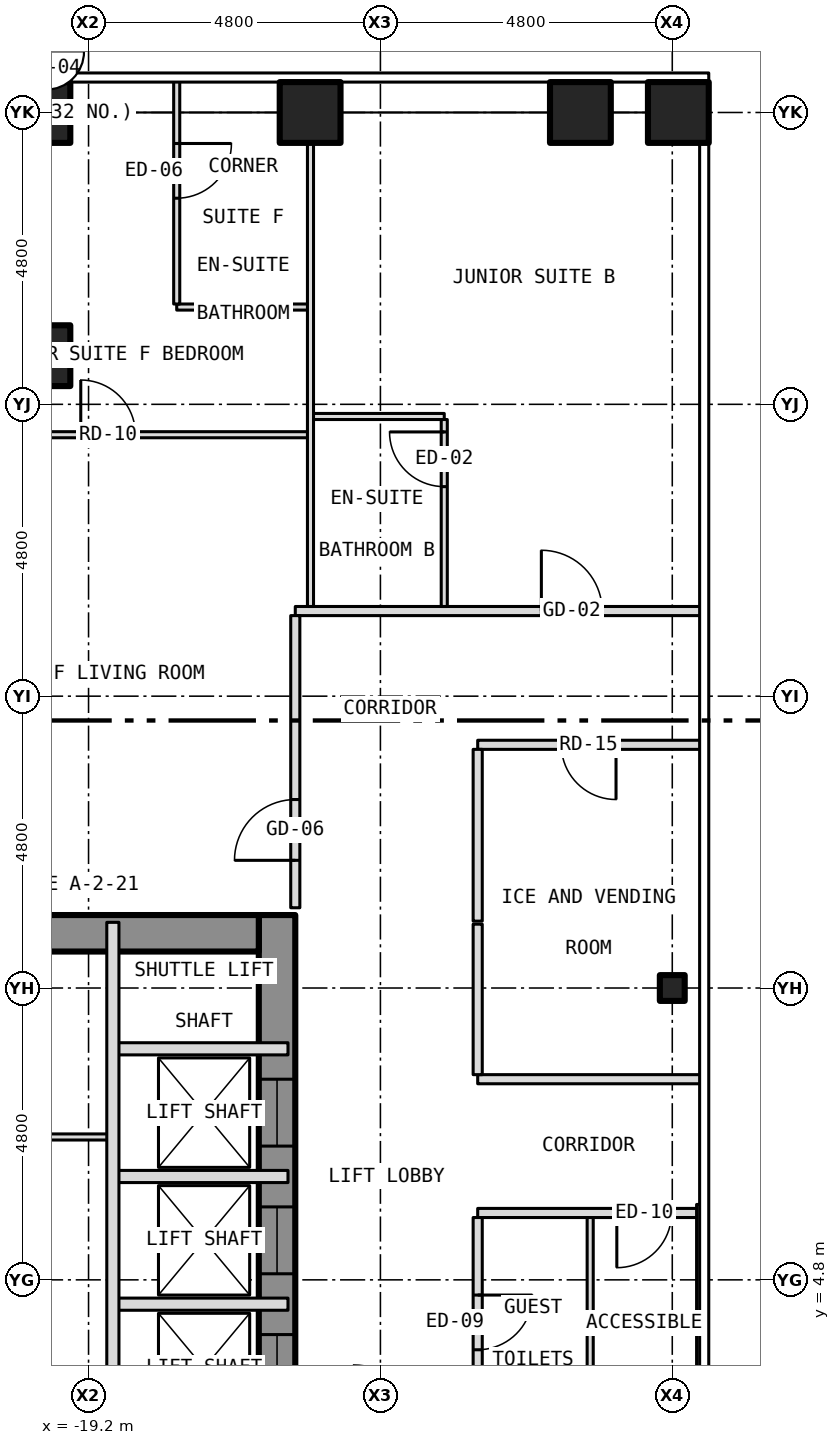
"""IFC4 building model, lengths in metres.
Left out: names, types, materials, properties, quantities, classifications, styles, units other than length and angle.
Written with IfcOpenShell. Run it as: python <this file> out.ifc"""

import sys

from ifc_helpers import new_model, si_unit, direction, frame, frame_2d, origin, origin_2d, place, context, subcontext, project, spatial, rectangle, hollow_rectangle, i_section, extrude, element, fill, save


model = new_model("IFC4")
c1 = context("Model", 3, precision=1e-05, world=origin(), true_north=direction((0.0, 1.0)))
c2 = subcontext(c1, "Body", "Model", "MODEL_VIEW")
j1 = project(units=[si_unit("LENGTHUNIT", "METRE"), si_unit("PLANEANGLEUNIT", "RADIAN")], contexts=[c1])
p1 = place(None, origin())
s1 = spatial("IfcSite", under=j1, at=p1, CompositionType="ELEMENT")
p2 = place(p1, origin())
s2 = spatial("IfcBuilding", under=s1, at=p2, CompositionType="ELEMENT")
p3 = place(p2, frame((0.0, 0.0, 77.5)))
s3 = spatial("IfcBuildingStorey", under=s2, at=p3, CompositionType="ELEMENT", Elevation=77.5)
for number, where, z_axis, x_axis in (
    (1, (-20.0, 24.0, -0.15), (0.0, 0.0, 1.0), (1.0, 0.0, 0.0)),
    (2, (-15.556, 24.0, -0.15), (0.0, 0.0, 1.0), (1.0, 0.0, 0.0)),
    (3, (-11.111, 24.0, -0.15), (0.0, 0.0, 1.0), (1.0, 0.0, 0.0)),
    (4, (-20.0, 20.0, -0.15), (0.0, 0.0, 1.0), (1.0, 0.0, 0.0)),
    (5, (-9.5, 24.0, -0.15), (0.0, 0.0, 1.0), (1.0, 0.0, 0.0)),
):
    element("IfcColumn", number, at=place(p3, frame(where, z_axis=z_axis, x_axis=x_axis)), inside=s3, PredefinedType="COLUMN", context=c2, shape_type="SweptSolid", body=[
        extrude(hollow_rectangle(XDim=1.0, YDim=1.0, WallThickness=0.06, at=origin_2d()), origin(), (0.0, 0.0, 1.0), 3.5),
    ])
p4 = place(p3, frame((-9.6, 9.6, -0.15), z_axis=(0.0, 0.0, 1.0), x_axis=(1.0, 0.0, 0.0)))
e6 = element("IfcColumn", 6, at=p4, inside=s3, PredefinedType="COLUMN", context=c2, shape_type="SweptSolid", body=[
    extrude(i_section(OverallWidth=0.409, OverallDepth=0.424, WebThickness=0.033, FlangeThickness=0.052, at=origin_2d()), origin(), (0.0, 0.0, 1.0), 3.5),
])
p5 = place(p3, frame((-16.1, -10.8, 0.0), z_axis=(0.0, 0.0, 1.0), x_axis=(0.0, 1.0, 0.0)))
e7 = element("IfcWall", 7, at=p5, inside=s3, PredefinedType="SHEAR", context=c2, shape_type="SweptSolid", body=[
    extrude(rectangle(XDim=21.6, YDim=0.6, at=frame_2d((10.8, 0.0))), origin(), (0.0, 0.0, 1.0), 3.25),
])
p6 = place(p5, frame((9.4, 0.0, 0.0)))
e8 = element("IfcOpeningElement", 8, at=p6, cuts=e7, PredefinedType="OPENING", context=c2, shape_type="SweptSolid", body=[
    extrude(rectangle(XDim=1.1, YDim=2.1, at=frame_2d((0.55, 1.05))), frame((0.0, 0.312, 0.0), z_axis=(0.0, -1.0, 0.0), x_axis=(1.0, 0.0, 0.0)), (0.0, 0.0, 1.0), 0.624),
])
p7 = place(p5, frame((11.5, 0.0, 0.0)))
e9 = element("IfcOpeningElement", 9, at=p7, cuts=e7, PredefinedType="OPENING", context=c2, shape_type="SweptSolid", body=[
    extrude(rectangle(XDim=1.1, YDim=2.1, at=frame_2d((0.55, 1.05))), frame((0.0, 0.312, 0.0), z_axis=(0.0, -1.0, 0.0), x_axis=(1.0, 0.0, 0.0)), (0.0, 0.0, 1.0), 0.624),
])
p8 = place(p5, frame((13.6, 0.0, 0.0)))
e10 = element("IfcOpeningElement", 10, at=p8, cuts=e7, PredefinedType="OPENING", context=c2, shape_type="SweptSolid", body=[
    extrude(rectangle(XDim=1.1, YDim=2.1, at=frame_2d((0.55, 1.05))), frame((0.0, 0.312, 0.0), z_axis=(0.0, -1.0, 0.0), x_axis=(1.0, 0.0, 0.0)), (0.0, 0.0, 1.0), 0.624),
])
p9 = place(p5, frame((15.7, 0.0, 0.0)))
e11 = element("IfcOpeningElement", 11, at=p9, cuts=e7, PredefinedType="OPENING", context=c2, shape_type="SweptSolid", body=[
    extrude(rectangle(XDim=1.1, YDim=2.1, at=frame_2d((0.55, 1.05))), frame((0.0, 0.312, 0.0), z_axis=(0.0, -1.0, 0.0), x_axis=(1.0, 0.0, 0.0)), (0.0, 0.0, 1.0), 0.624),
])
p10 = place(p5, frame((17.8, 0.0, 0.0)))
e12 = element("IfcOpeningElement", 12, at=p10, cuts=e7, PredefinedType="OPENING", context=c2, shape_type="SweptSolid", body=[
    extrude(rectangle(XDim=1.1, YDim=2.1, at=frame_2d((0.55, 1.05))), frame((0.0, 0.312, 0.0), z_axis=(0.0, -1.0, 0.0), x_axis=(1.0, 0.0, 0.0)), (0.0, 0.0, 1.0), 0.624),
])
p11 = place(p5, frame((0.758, 0.0, 0.0)))
e13 = element("IfcOpeningElement", 13, at=p11, cuts=e7, PredefinedType="OPENING", context=c2, shape_type="SweptSolid", body=[
    extrude(rectangle(XDim=1.1, YDim=2.1, at=frame_2d((0.55, 1.05))), frame((0.0, 0.312, 0.0), z_axis=(0.0, -1.0, 0.0), x_axis=(1.0, 0.0, 0.0)), (0.0, 0.0, 1.0), 0.624),
])
p12 = place(p5, frame((7.5, 0.0, 0.0)))
e14 = element("IfcOpeningElement", 14, at=p12, cuts=e7, PredefinedType="OPENING", context=c2, shape_type="SweptSolid", body=[
    extrude(rectangle(XDim=1.1, YDim=2.1, at=frame_2d((0.55, 1.05))), frame((0.0, 0.312, 0.0), z_axis=(0.0, -1.0, 0.0), x_axis=(1.0, 0.0, 0.0)), (0.0, 0.0, 1.0), 0.624),
])
p13 = place(p3, frame((-23.4, 10.5, 0.0), z_axis=(0.0, 0.0, 1.0), x_axis=(1.0, 0.0, 0.0)))
e15 = element("IfcWall", 15, at=p13, inside=s3, PredefinedType="SHEAR", context=c2, shape_type="SweptSolid", body=[
    extrude(rectangle(XDim=7.0, YDim=0.6, at=frame_2d((3.5, 0.0))), origin(), (0.0, 0.0, 1.0), 3.25),
])
p14 = place(p3, frame((-18.8, 4.4, 0.0), z_axis=(0.0, 0.0, 1.0), x_axis=(1.0, 0.0, 0.0)))
e16 = element("IfcWall", 16, at=p14, inside=s3, PredefinedType="PARTITIONING", context=c2, shape_type="SweptSolid", body=[
    extrude(rectangle(XDim=2.88, YDim=0.2, at=frame_2d((1.44, 0.0))), origin(), (0.0, 0.0, 1.0), 3.25),
])
p15 = place(p3, frame((-12.8, 5.9, 0.0), z_axis=(0.0, 0.0, 1.0), x_axis=(1.0, 0.0, 0.0)))
e17 = element("IfcWall", 17, at=p15, inside=s3, PredefinedType="PARTITIONING", context=c2, shape_type="SweptSolid", body=[
    extrude(rectangle(XDim=3.65, YDim=0.15, at=frame_2d((1.825, 0.0))), origin(), (0.0, 0.0, 1.0), 3.35),
])
p16 = place(p15, frame((2.288, 0.0, 0.0)))
e18 = element("IfcOpeningElement", 18, at=p16, cuts=e17, PredefinedType="OPENING", context=c2, shape_type="SweptSolid", body=[
    extrude(rectangle(XDim=0.9, YDim=2.1, at=frame_2d((0.45, 1.05))), frame((0.0, 0.087, 0.0), z_axis=(0.0, -1.0, 0.0), x_axis=(1.0, 0.0, 0.0)), (0.0, 0.0, 1.0), 0.174),
])
p17 = place(p3, frame((-18.8, 6.5, 0.0), z_axis=(0.0, 0.0, 1.0), x_axis=(1.0, 0.0, 0.0)))
e19 = element("IfcWall", 19, at=p17, inside=s3, PredefinedType="PARTITIONING", context=c2, shape_type="SweptSolid", body=[
    extrude(rectangle(XDim=2.88, YDim=0.2, at=frame_2d((1.44, 0.0))), origin(), (0.0, 0.0, 1.0), 3.25),
])
p18 = place(p3, frame((-23.88, 7.15, 0.0), z_axis=(0.0, 0.0, 1.0), x_axis=(1.0, 0.0, 0.0)))
e20 = element("IfcWall", 20, at=p18, inside=s3, PredefinedType="PARTITIONING", context=c2, shape_type="SweptSolid", body=[
    extrude(rectangle(XDim=5.08, YDim=0.1, at=frame_2d((2.54, 0.0))), origin(), (0.0, 0.0, 1.0), 3.25),
])
p19 = place(p18, frame((2.03, 0.0, 0.0)))
e21 = element("IfcOpeningElement", 21, at=p19, cuts=e20, PredefinedType="OPENING", context=c2, shape_type="SweptSolid", body=[
    extrude(rectangle(XDim=0.9, YDim=2.1, at=frame_2d((0.45, 1.05))), frame((0.0, 0.062, 0.0), z_axis=(0.0, -1.0, 0.0), x_axis=(1.0, 0.0, 0.0)), (0.0, 0.0, 1.0), 0.124),
])
p20 = place(p3, frame((-12.8, 8.1, 0.0), z_axis=(0.0, 0.0, 1.0), x_axis=(1.0, 0.0, 0.0)))
e22 = element("IfcWall", 22, at=p20, inside=s3, PredefinedType="PARTITIONING", context=c2, shape_type="SweptSolid", body=[
    extrude(rectangle(XDim=3.68, YDim=0.15, at=frame_2d((1.84, 0.0))), origin(), (0.0, 0.0, 1.0), 3.35),
])
p21 = place(p3, frame((-18.8, 8.6, 0.0), z_axis=(0.0, 0.0, 1.0), x_axis=(1.0, 0.0, 0.0)))
e23 = element("IfcWall", 23, at=p21, inside=s3, PredefinedType="PARTITIONING", context=c2, shape_type="SweptSolid", body=[
    extrude(rectangle(XDim=2.88, YDim=0.2, at=frame_2d((1.44, 0.0))), origin(), (0.0, 0.0, 1.0), 3.25),
])
p22 = place(p3, frame((-12.8, 13.6, 0.0), z_axis=(0.0, 0.0, 1.0), x_axis=(1.0, 0.0, 0.0)))
e24 = element("IfcWall", 24, at=p22, inside=s3, PredefinedType="PARTITIONING", context=c2, shape_type="SweptSolid", body=[
    extrude(rectangle(XDim=3.68, YDim=0.15, at=frame_2d((1.84, 0.0))), origin(), (0.0, 0.0, 1.0), 3.35),
])
p23 = place(p22, frame((1.375, 0.0, 0.0)))
e25 = element("IfcOpeningElement", 25, at=p23, cuts=e24, PredefinedType="OPENING", context=c2, shape_type="SweptSolid", body=[
    extrude(rectangle(XDim=0.9, YDim=2.1, at=frame_2d((0.45, 1.05))), frame((0.0, 0.087, 0.0), z_axis=(0.0, -1.0, 0.0), x_axis=(1.0, 0.0, 0.0)), (0.0, 0.0, 1.0), 0.174),
])
p24 = place(p3, frame((-15.8, 15.8, 0.0), z_axis=(0.0, 0.0, 1.0), x_axis=(1.0, 0.0, 0.0)))
e26 = element("IfcWall", 26, at=p24, inside=s3, PredefinedType="PARTITIONING", context=c2, shape_type="SweptSolid", body=[
    extrude(rectangle(XDim=6.68, YDim=0.15, at=frame_2d((3.34, 0.0))), origin(), (0.0, 0.0, 1.0), 3.35),
])
p25 = place(p24, frame((4.047, 0.0, 0.0)))
e27 = element("IfcOpeningElement", 27, at=p25, cuts=e26, PredefinedType="OPENING", context=c2, shape_type="SweptSolid", body=[
    extrude(rectangle(XDim=1.0, YDim=2.1, at=frame_2d((0.5, 1.05))), frame((0.0, 0.087, 0.0), z_axis=(0.0, -1.0, 0.0), x_axis=(1.0, 0.0, 0.0)), (0.0, 0.0, 1.0), 0.174),
])
p26 = place(p3, frame((-24.53, 18.7, 0.0), z_axis=(0.0, 0.0, 1.0), x_axis=(1.0, 0.0, 0.0)))
e28 = element("IfcWall", 28, at=p26, inside=s3, PredefinedType="PARTITIONING", context=c2, shape_type="SweptSolid", body=[
    extrude(rectangle(XDim=8.98, YDim=0.1, at=frame_2d((4.49, 0.0))), origin(), (0.0, 0.0, 1.0), 3.35),
])
p27 = place(p26, frame((5.202, 0.0, 0.0)))
e29 = element("IfcOpeningElement", 29, at=p27, cuts=e28, PredefinedType="OPENING", context=c2, shape_type="SweptSolid", body=[
    extrude(rectangle(XDim=0.9, YDim=2.1, at=frame_2d((0.45, 1.05))), frame((0.0, 0.062, 0.0), z_axis=(0.0, -1.0, 0.0), x_axis=(1.0, 0.0, 0.0)), (0.0, 0.0, 1.0), 0.124),
])
for number, where, z_axis, x_axis in (
    (30, (-15.55, 19.0, 0.0), (0.0, 0.0, 1.0), (1.0, 0.0, 0.0)),
    (31, (-17.75, 20.8, 0.0), (0.0, 0.0, 1.0), (1.0, 0.0, 0.0)),
):
    element("IfcWall", number, at=place(p3, frame(where, z_axis=z_axis, x_axis=x_axis)), inside=s3, PredefinedType="PARTITIONING", context=c2, shape_type="SweptSolid", body=[
        extrude(rectangle(XDim=2.2, YDim=0.1, at=frame_2d((1.1, 0.0))), origin(), (0.0, 0.0, 1.0), 3.35),
    ])
p28 = place(p3, frame((-18.8, -1.8, 0.0), z_axis=(0.0, 0.0, 1.0), x_axis=(0.0, 1.0, 0.0)))
e32 = element("IfcWall", 32, at=p28, inside=s3, PredefinedType="PARTITIONING", context=c2, shape_type="SweptSolid", body=[
    extrude(rectangle(XDim=12.48, YDim=0.2, at=frame_2d((6.24, 0.0))), origin(), (0.0, 0.0, 1.0), 3.25),
])
p29 = place(p3, frame((-17.75, 20.85, 0.0), z_axis=(0.0, 0.0, 1.0), x_axis=(0.0, 1.0, 0.0)))
e33 = element("IfcWall", 33, at=p29, inside=s3, PredefinedType="PARTITIONING", context=c2, shape_type="SweptSolid", body=[
    extrude(rectangle(XDim=3.68, YDim=0.1, at=frame_2d((1.84, 0.0))), origin(), (0.0, 0.0, 1.0), 3.35),
])
p30 = place(p29, frame((1.74, 0.0, 0.0)))
e34 = element("IfcOpeningElement", 34, at=p30, cuts=e33, PredefinedType="OPENING", context=c2, shape_type="SweptSolid", body=[
    extrude(rectangle(XDim=0.9, YDim=2.1, at=frame_2d((0.45, 1.05))), frame((0.0, 0.062, 0.0), z_axis=(0.0, -1.0, 0.0), x_axis=(1.0, 0.0, 0.0)), (0.0, 0.0, 1.0), 0.124),
])
p31 = place(p3, frame((-15.8, 10.92, 0.0), z_axis=(0.0, 0.0, 1.0), x_axis=(0.0, 1.0, 0.0)))
e35 = element("IfcWall", 35, at=p31, inside=s3, PredefinedType="PARTITIONING", context=c2, shape_type="SweptSolid", body=[
    extrude(rectangle(XDim=4.805, YDim=0.15, at=frame_2d((2.403, 0.0))), origin(), (0.0, 0.0, 1.0), 3.35),
])
p32 = place(p31, frame((0.78, 0.0, 0.0)))
e36 = element("IfcOpeningElement", 36, at=p32, cuts=e35, PredefinedType="OPENING", context=c2, shape_type="SweptSolid", body=[
    extrude(rectangle(XDim=1.0, YDim=2.1, at=frame_2d((0.5, 1.05))), frame((0.0, 0.087, 0.0), z_axis=(0.0, -1.0, 0.0), x_axis=(1.0, 0.0, 0.0)), (0.0, 0.0, 1.0), 0.174),
])
p33 = place(p3, frame((-15.55, 15.875, 0.0), z_axis=(0.0, 0.0, 1.0), x_axis=(0.0, 1.0, 0.0)))
e37 = element("IfcWall", 37, at=p33, inside=s3, PredefinedType="PARTITIONING", context=c2, shape_type="SweptSolid", body=[
    extrude(rectangle(XDim=8.005, YDim=0.1, at=frame_2d((4.002, 0.0))), origin(), (0.0, 0.0, 1.0), 3.35),
])
p34 = place(p3, frame((-13.35, 15.875, 0.0), z_axis=(0.0, 0.0, 1.0), x_axis=(0.0, 1.0, 0.0)))
e38 = element("IfcWall", 38, at=p34, inside=s3, PredefinedType="PARTITIONING", context=c2, shape_type="SweptSolid", body=[
    extrude(rectangle(XDim=3.075, YDim=0.1, at=frame_2d((1.538, 0.0))), origin(), (0.0, 0.0, 1.0), 3.35),
])
p35 = place(p34, frame((1.971, 0.0, 0.0)))
e39 = element("IfcOpeningElement", 39, at=p35, cuts=e38, PredefinedType="OPENING", context=c2, shape_type="SweptSolid", body=[
    extrude(rectangle(XDim=0.9, YDim=2.1, at=frame_2d((0.45, 1.05))), frame((0.0, 0.062, 0.0), z_axis=(0.0, -1.0, 0.0), x_axis=(1.0, 0.0, 0.0)), (0.0, 0.0, 1.0), 0.124),
])
p36 = place(p3, frame((-12.8, 2.4, 0.0), z_axis=(0.0, 0.0, 1.0), x_axis=(0.0, 1.0, 0.0)))
e40 = element("IfcWall", 40, at=p36, inside=s3, PredefinedType="PARTITIONING", context=c2, shape_type="SweptSolid", body=[
    extrude(rectangle(XDim=3.425, YDim=0.15, at=frame_2d((1.712, 0.0))), origin(), (0.0, 0.0, 1.0), 3.35),
])
p37 = place(p36, frame((1.25, 0.0, 0.0)))
e41 = element("IfcOpeningElement", 41, at=p37, cuts=e40, PredefinedType="OPENING", context=c2, shape_type="SweptSolid", body=[
    extrude(rectangle(XDim=0.9, YDim=2.1, at=frame_2d((0.45, 1.05))), frame((0.0, 0.087, 0.0), z_axis=(0.0, -1.0, 0.0), x_axis=(1.0, 0.0, 0.0)), (0.0, 0.0, 1.0), 0.174),
])
p38 = place(p3, frame((-12.8, 8.175, 0.0), z_axis=(0.0, 0.0, 1.0), x_axis=(0.0, 1.0, 0.0)))
e42 = element("IfcWall", 42, at=p38, inside=s3, PredefinedType="PARTITIONING", context=c2, shape_type="SweptSolid", body=[
    extrude(rectangle(XDim=2.475, YDim=0.15, at=frame_2d((1.237, 0.0))), origin(), (0.0, 0.0, 1.0), 3.35),
])
p39 = place(p3, frame((-12.8, 10.7, 0.0), z_axis=(0.0, 0.0, 1.0), x_axis=(0.0, 1.0, 0.0)))
e43 = element("IfcWall", 43, at=p39, inside=s3, PredefinedType="PARTITIONING", context=c2, shape_type="SweptSolid", body=[
    extrude(rectangle(XDim=2.825, YDim=0.15, at=frame_2d((1.413, 0.0))), origin(), (0.0, 0.0, 1.0), 3.35),
])
p40 = place(p3, frame((-10.95, 1.875, 0.0), z_axis=(0.0, 0.0, 1.0), x_axis=(0.0, 1.0, 0.0)))
e44 = element("IfcWall", 44, at=p40, inside=s3, PredefinedType="PARTITIONING", context=c2, shape_type="SweptSolid", body=[
    extrude(rectangle(XDim=3.95, YDim=0.1, at=frame_2d((1.975, 0.0))), origin(), (0.0, 0.0, 1.0), 3.35),
])
p41 = place(p3, frame((-9.15, 1.66, 0.0), z_axis=(0.0, 0.0, 1.0), x_axis=(0.0, 1.0, 0.0)))
e45 = element("IfcWall", 45, at=p41, inside=s3, PredefinedType="PARTITIONING", context=c2, shape_type="SweptSolid", body=[
    extrude(rectangle(XDim=4.38, YDim=0.1, at=frame_2d((2.19, 0.0))), origin(), (0.0, 0.0, 1.0), 2.733),
])
p42 = place(p8, origin())
e46 = element("IfcDoor", 46, at=p42, inside=s3, OperationType="SLIDING_TO_LEFT", PredefinedType="DOOR", context=c2, shape_type="SweptSolid", body=[
    extrude(rectangle(XDim=1.1, YDim=2.1, at=frame_2d((0.55, 1.05))), frame((0.0, 0.025, 0.0), z_axis=(0.0, -1.0, 0.0), x_axis=(1.0, 0.0, 0.0)), (0.0, 0.0, 1.0), 0.05),
])
fill(e10, e46)
p43 = place(p9, origin())
e47 = element("IfcDoor", 47, at=p43, inside=s3, OperationType="SLIDING_TO_LEFT", PredefinedType="DOOR", context=c2, shape_type="SweptSolid", body=[
    extrude(rectangle(XDim=1.1, YDim=2.1, at=frame_2d((0.55, 1.05))), frame((0.0, 0.025, 0.0), z_axis=(0.0, -1.0, 0.0), x_axis=(1.0, 0.0, 0.0)), (0.0, 0.0, 1.0), 0.05),
])
fill(e11, e47)
p44 = place(p10, origin())
e48 = element("IfcDoor", 48, at=p44, inside=s3, OperationType="SLIDING_TO_LEFT", PredefinedType="DOOR", context=c2, shape_type="SweptSolid", body=[
    extrude(rectangle(XDim=1.1, YDim=2.1, at=frame_2d((0.55, 1.05))), frame((0.0, 0.025, 0.0), z_axis=(0.0, -1.0, 0.0), x_axis=(1.0, 0.0, 0.0)), (0.0, 0.0, 1.0), 0.05),
])
fill(e12, e48)
p45 = place(p25, origin())
e49 = element("IfcDoor", 49, at=p45, inside=s3, OperationType="SINGLE_SWING_LEFT", PredefinedType="DOOR", context=c2, shape_type="SweptSolid", body=[
    extrude(rectangle(XDim=1.0, YDim=2.1, at=frame_2d((0.5, 1.05))), frame((0.0, 0.025, 0.0), z_axis=(0.0, -1.0, 0.0), x_axis=(1.0, 0.0, 0.0)), (0.0, 0.0, 1.0), 0.05),
])
fill(e27, e49)
p46 = place(p35, origin())
e50 = element("IfcDoor", 50, at=p46, inside=s3, OperationType="SINGLE_SWING_RIGHT", PredefinedType="DOOR", context=c2, shape_type="SweptSolid", body=[
    extrude(rectangle(XDim=0.9, YDim=2.1, at=frame_2d((0.45, 1.05))), frame((0.0, 0.025, 0.0), z_axis=(0.0, -1.0, 0.0), x_axis=(1.0, 0.0, 0.0)), (0.0, 0.0, 1.0), 0.05),
])
fill(e39, e50)
p47 = place(p32, origin())
e51 = element("IfcDoor", 51, at=p47, inside=s3, OperationType="SINGLE_SWING_LEFT", PredefinedType="DOOR", context=c2, shape_type="SweptSolid", body=[
    extrude(rectangle(XDim=1.0, YDim=2.1, at=frame_2d((0.5, 1.05))), frame((0.0, 0.025, 0.0), z_axis=(0.0, -1.0, 0.0), x_axis=(1.0, 0.0, 0.0)), (0.0, 0.0, 1.0), 0.05),
])
fill(e36, e51)
p48 = place(p27, origin())
e52 = element("IfcDoor", 52, at=p48, inside=s3, OperationType="SINGLE_SWING_LEFT", PredefinedType="DOOR", context=c2, shape_type="SweptSolid", body=[
    extrude(rectangle(XDim=0.9, YDim=2.1, at=frame_2d((0.45, 1.05))), frame((0.0, 0.025, 0.0), z_axis=(0.0, -1.0, 0.0), x_axis=(1.0, 0.0, 0.0)), (0.0, 0.0, 1.0), 0.05),
])
fill(e29, e52)
p49 = place(p30, origin())
e53 = element("IfcDoor", 53, at=p49, inside=s3, OperationType="SINGLE_SWING_RIGHT", PredefinedType="DOOR", context=c2, shape_type="SweptSolid", body=[
    extrude(rectangle(XDim=0.9, YDim=2.1, at=frame_2d((0.45, 1.05))), frame((0.0, 0.025, 0.0), z_axis=(0.0, -1.0, 0.0), x_axis=(1.0, 0.0, 0.0)), (0.0, 0.0, 1.0), 0.05),
])
fill(e34, e53)
p50 = place(p37, origin())
e54 = element("IfcDoor", 54, at=p50, inside=s3, OperationType="SINGLE_SWING_RIGHT", PredefinedType="DOOR", context=c2, shape_type="SweptSolid", body=[
    extrude(rectangle(XDim=0.9, YDim=2.1, at=frame_2d((0.45, 1.05))), frame((0.0, 0.025, 0.0), z_axis=(0.0, -1.0, 0.0), x_axis=(1.0, 0.0, 0.0)), (0.0, 0.0, 1.0), 0.05),
])
fill(e41, e54)
p51 = place(p16, origin())
e55 = element("IfcDoor", 55, at=p51, inside=s3, OperationType="SINGLE_SWING_LEFT", PredefinedType="DOOR", context=c2, shape_type="SweptSolid", body=[
    extrude(rectangle(XDim=0.9, YDim=2.1, at=frame_2d((0.45, 1.05))), frame((0.0, 0.025, 0.0), z_axis=(0.0, -1.0, 0.0), x_axis=(1.0, 0.0, 0.0)), (0.0, 0.0, 1.0), 0.05),
])
fill(e18, e55)
p52 = place(p23, origin())
e56 = element("IfcDoor", 56, at=p52, inside=s3, OperationType="SINGLE_SWING_RIGHT", PredefinedType="DOOR", context=c2, shape_type="SweptSolid", body=[
    extrude(rectangle(XDim=0.9, YDim=2.1, at=frame_2d((0.45, 1.05))), frame((0.0, 0.025, 0.0), z_axis=(0.0, -1.0, 0.0), x_axis=(1.0, 0.0, 0.0)), (0.0, 0.0, 1.0), 0.05),
])
fill(e25, e56)
save(model, sys.argv[1])
